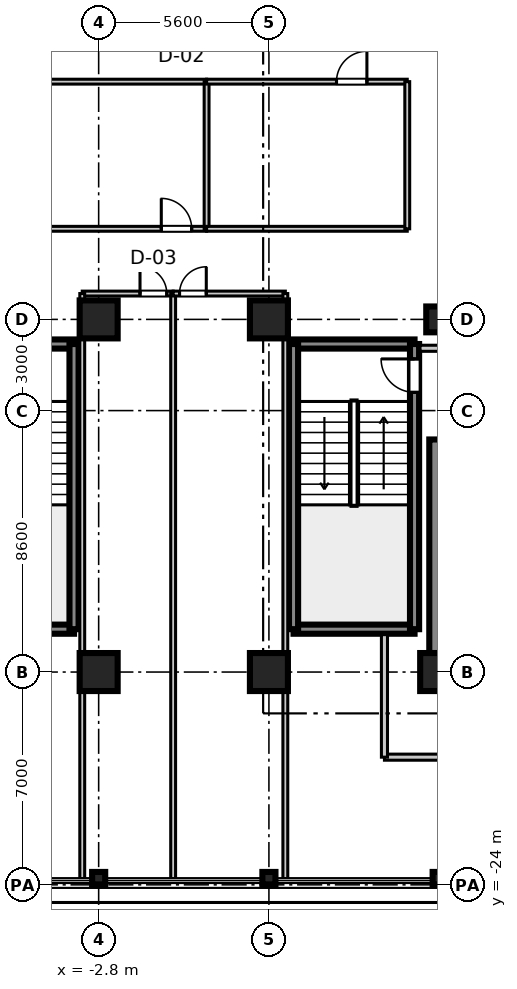
"""IFC4 building model, lengths in metres.
Left out: names, types, materials, properties, quantities, classifications, styles, units other than length and angle.
Written with IfcOpenShell. Run it as: python <this file> out.ifc"""

import sys

from ifc_helpers import new_model, si_unit, direction, frame, frame_2d, origin, origin_2d, place, context, subcontext, project, spatial, rectangle, i_section, extrude, source, transform, mapped, element, fill, save


model = new_model("IFC4")
c1 = context("Model", 3, precision=1e-05, world=origin(), true_north=direction((0.0, 1.0)))
c2 = subcontext(c1, "Body", "Model", "MODEL_VIEW")
j1 = project(units=[si_unit("LENGTHUNIT", "METRE"), si_unit("PLANEANGLEUNIT", "RADIAN")], contexts=[c1])
p1 = place(None, origin())
s1 = spatial("IfcSite", under=j1, at=p1, CompositionType="ELEMENT")
p2 = place(p1, origin())
s2 = spatial("IfcBuilding", under=s1, at=p2, CompositionType="ELEMENT")
p3 = place(p2, frame((0.0, 0.0, 88.3)))
s3 = spatial("IfcBuildingStorey", under=s2, at=p3, CompositionType="ELEMENT", Elevation=88.3)
m1 = source(origin(), c2, "Body", "SweptSolid", [
    extrude(rectangle(XDim=1.25, YDim=1.25, at=origin_2d()), origin(), (0.0, 0.0, 1.0), 3.605),
])
for number, where, z_axis, x_axis in (
    (1, (-2.8, -17.0, 0.0), (0.0, 0.0, 1.0), (1.0, 0.0, 0.0)),
    (2, (-2.8, -5.4, 0.0), (0.0, 0.0, 1.0), (1.0, 0.0, 0.0)),
    (3, (2.8, -17.0, 0.0), (0.0, 0.0, 1.0), (1.0, 0.0, 0.0)),
    (4, (2.8, -5.4, 0.0), (0.0, 0.0, 1.0), (1.0, 0.0, 0.0)),
    (5, (8.4, -17.0, 0.0), (0.0, 0.0, 1.0), (1.0, 0.0, 0.0)),
):
    element("IfcColumn", number, at=place(p3, frame(where, z_axis=z_axis, x_axis=x_axis)), inside=s3, PredefinedType="COLUMN", context=c2, shape_type="MappedRepresentation", body=[
        mapped(m1, transform((0.0, 0.0, 0.0), scale=1.0)),
    ])
m2 = source(origin(), c2, "Body", "SweptSolid", [
    extrude(rectangle(XDim=0.85, YDim=0.85, at=origin_2d()), origin(), (0.0, 0.0, 1.0), 3.605),
])
p4 = place(p3, frame((8.4, -5.4, 0.0), z_axis=(0.0, 0.0, 1.0), x_axis=(1.0, 0.0, 0.0)))
e6 = element("IfcColumn", 6, at=p4, inside=s3, PredefinedType="PILASTER", context=c2, shape_type="MappedRepresentation", body=[
    mapped(m2, transform((0.0, 0.0, 0.0), scale=1.0)),
])
m3 = source(origin(), c2, "Body", "SweptSolid", [
    extrude(i_section(OverallWidth=0.409, OverallDepth=0.43, WebThickness=0.021, FlangeThickness=0.034, at=origin_2d()), origin(), (0.0, 0.0, 1.0), 3.605),
])
for number, where, z_axis, x_axis in (
    (7, (-2.8, -23.78, 0.0), (0.0, 0.0, 1.0), (0.0, 1.0, 0.0)),
    (8, (2.8, -23.78, 0.0), (0.0, 0.0, 1.0), (0.0, 1.0, 0.0)),
    (9, (8.4, -23.78, 0.0), (0.0, 0.0, 1.0), (0.0, 1.0, 0.0)),
):
    element("IfcColumn", number, at=place(p3, frame(where, z_axis=z_axis, x_axis=x_axis)), inside=s3, PredefinedType="COLUMN", context=c2, shape_type="MappedRepresentation", body=[
        mapped(m3, transform((0.0, 0.0, 0.0), scale=1.0)),
    ])
m4 = source(origin(), c2, "Body", "SweptSolid", [
    extrude(rectangle(XDim=7.65, YDim=0.65, at=frame_2d((3.825, 0.0))), origin(), (0.0, 0.0, 1.0), 3.38),
])
p5 = place(p3, frame((8.4, -17.0, 0.0), z_axis=(0.0, 0.0, 1.0), x_axis=(0.0, 1.0, 0.0)))
e10 = element("IfcWall", 10, at=p5, inside=s3, PredefinedType="SHEAR", context=c2, shape_type="MappedRepresentation", body=[
    mapped(m4, transform((0.0, 0.0, 0.0), scale=1.0)),
])
m5 = source(origin(), c2, "Body", "SweptSolid", [
    extrude(rectangle(XDim=3.98, YDim=0.3, at=frame_2d((1.99, 0.0))), origin(), (0.0, 0.0, 1.0), 3.38),
])
for number, where, z_axis, x_axis in (
    (11, (3.61, -15.59, 0.0), (0.0, 0.0, 1.0), (1.0, 0.0, 0.0)),
    (12, (3.61, -6.21, 0.0), (0.0, 0.0, 1.0), (1.0, 0.0, 0.0)),
):
    element("IfcWall", number, at=place(p3, frame(where, z_axis=z_axis, x_axis=x_axis)), inside=s3, PredefinedType="SHEAR", context=c2, shape_type="MappedRepresentation", body=[
        mapped(m5, transform((0.0, 0.0, 0.0), scale=1.0)),
    ])
m6 = source(origin(), c2, "Body", "SweptSolid", [
    extrude(rectangle(XDim=9.38, YDim=0.3, at=frame_2d((4.69, 0.0))), origin(), (0.0, 0.0, 1.0), 3.38),
])
p6 = place(p3, frame((3.61, -15.59, 0.0), z_axis=(0.0, 0.0, 1.0), x_axis=(0.0, 1.0, 0.0)))
e13 = element("IfcWall", 13, at=p6, inside=s3, PredefinedType="SHEAR", context=c2, shape_type="MappedRepresentation", body=[
    mapped(m6, transform((0.0, 0.0, 0.0), scale=1.0)),
])
p7 = place(p3, frame((7.59, -15.59, 0.0), z_axis=(0.0, 0.0, 1.0), x_axis=(0.0, 1.0, 0.0)))
e14 = element("IfcWall", 14, at=p7, inside=s3, PredefinedType="SHEAR", context=c2, shape_type="MappedRepresentation", body=[
    mapped(m6, transform((0.0, 0.0, 0.0), scale=1.0)),
])
p8 = place(p7, frame((7.79, 0.0, 0.0)))
e15 = element("IfcOpeningElement", 15, at=p8, cuts=e14, PredefinedType="OPENING", context=c2, shape_type="SweptSolid", body=[
    extrude(rectangle(XDim=1.1, YDim=2.15, at=frame_2d((0.55, 1.075))), frame((0.0, 0.16, 0.0), z_axis=(0.0, -1.0, 0.0), x_axis=(1.0, 0.0, 0.0)), (0.0, 0.0, 1.0), 0.32),
])
p9 = place(p3, frame((-7.59, -15.59, 0.0), z_axis=(0.0, 0.0, 1.0), x_axis=(1.0, 0.0, 0.0)))
e16 = element("IfcWall", 16, at=p9, inside=s3, PredefinedType="SHEAR", context=c2, shape_type="MappedRepresentation", body=[
    mapped(m5, transform((0.0, 0.0, 0.0), scale=1.0)),
])
p10 = place(p3, frame((-7.59, -6.21, 0.0), z_axis=(0.0, 0.0, 1.0), x_axis=(1.0, 0.0, 0.0)))
e17 = element("IfcWall", 17, at=p10, inside=s3, PredefinedType="SHEAR", context=c2, shape_type="MappedRepresentation", body=[
    mapped(m5, transform((0.0, 0.0, 0.0), scale=1.0)),
])
p11 = place(p10, frame((1.44, 0.0, 0.0)))
e18 = element("IfcOpeningElement", 18, at=p11, cuts=e17, PredefinedType="OPENING", context=c2, shape_type="SweptSolid", body=[
    extrude(rectangle(XDim=1.1, YDim=2.15, at=frame_2d((0.55, 1.075))), frame((0.0, 0.16, 0.0), z_axis=(0.0, -1.0, 0.0), x_axis=(1.0, 0.0, 0.0)), (0.0, 0.0, 1.0), 0.32),
])
p12 = place(p3, frame((-3.61, -15.59, 0.0), z_axis=(0.0, 0.0, 1.0), x_axis=(0.0, 1.0, 0.0)))
e19 = element("IfcWall", 19, at=p12, inside=s3, PredefinedType="SHEAR", context=c2, shape_type="MappedRepresentation", body=[
    mapped(m6, transform((0.0, 0.0, 0.0), scale=1.0)),
])
m7 = source(origin(), c2, "Body", "SweptSolid", [
    extrude(rectangle(XDim=5.82, YDim=0.2, at=frame_2d((2.91, 0.0))), origin(), (0.0, 0.0, 1.0), 2.72),
])
p13 = place(p3, frame((6.6, -19.8, 0.0), z_axis=(0.0, 0.0, 1.0), x_axis=(1.0, 0.0, 0.0)))
e20 = element("IfcWall", 20, at=p13, inside=s3, PredefinedType="PARTITIONING", context=c2, shape_type="MappedRepresentation", body=[
    mapped(m7, transform((0.0, 0.0, 0.0), scale=1.0)),
])
m8 = source(origin(), c2, "Body", "SweptSolid", [
    extrude(rectangle(XDim=4.03, YDim=0.2, at=frame_2d((2.015, 0.0))), origin(), (0.0, 0.0, 1.0), 2.72),
])
p14 = place(p3, frame((6.6, -19.8, 0.0), z_axis=(0.0, 0.0, 1.0), x_axis=(0.0, 1.0, 0.0)))
e21 = element("IfcWall", 21, at=p14, inside=s3, PredefinedType="PARTITIONING", context=c2, shape_type="MappedRepresentation", body=[
    mapped(m8, transform((0.0, 0.0, 0.0), scale=1.0)),
])
m9 = source(origin(), c2, "Body", "SweptSolid", [
    extrude(rectangle(XDim=0.97, YDim=0.2, at=frame_2d((0.485, 0.0))), origin(), (0.0, 0.0, 1.0), 2.72),
])
p15 = place(p3, frame((7.77, -6.35, 0.0), z_axis=(0.0, 0.0, 1.0), x_axis=(1.0, 0.0, 0.0)))
e22 = element("IfcWall", 22, at=p15, inside=s3, PredefinedType="PARTITIONING", context=c2, shape_type="MappedRepresentation", body=[
    mapped(m9, transform((0.0, 0.0, 0.0), scale=1.0)),
])
m10 = source(origin(), c2, "Body", "SweptSolid", [
    extrude(rectangle(XDim=2.99, YDim=0.16, at=frame_2d((1.495, 0.0))), origin(), (0.0, 0.0, 1.0), 2.72),
])
p16 = place(p3, frame((-3.34, -4.55, 0.0), z_axis=(0.0, 0.0, 1.0), x_axis=(1.0, 0.0, 0.0)))
e23 = element("IfcWall", 23, at=p16, inside=s3, PredefinedType="PARTITIONING", context=c2, shape_type="MappedRepresentation", body=[
    mapped(m10, transform((0.0, 0.0, 0.0), scale=1.0)),
])
p17 = place(p16, frame((1.9, 0.0, 0.0)))
e24 = element("IfcOpeningElement", 24, at=p17, cuts=e23, PredefinedType="OPENING", context=c2, shape_type="SweptSolid", body=[
    extrude(rectangle(XDim=0.88, YDim=2.1, at=frame_2d((0.44, 1.05))), frame((0.0, 0.09, 0.0), z_axis=(0.0, -1.0, 0.0), x_axis=(1.0, 0.0, 0.0)), (0.0, 0.0, 1.0), 0.18),
])
m11 = source(origin(), c2, "Body", "SweptSolid", [
    extrude(rectangle(XDim=19.25, YDim=0.16, at=frame_2d((9.625, 0.0))), origin(), (0.0, 0.0, 1.0), 2.72),
])
for number, where, z_axis, x_axis in (
    (25, (-3.34, -23.8, 0.0), (0.0, 0.0, 1.0), (0.0, 1.0, 0.0)),
    (26, (-0.35, -23.8, 0.0), (0.0, 0.0, 1.0), (0.0, 1.0, 0.0)),
):
    element("IfcWall", number, at=place(p3, frame(where, z_axis=z_axis, x_axis=x_axis)), inside=s3, PredefinedType="PARTITIONING", context=c2, shape_type="MappedRepresentation", body=[
        mapped(m11, transform((0.0, 0.0, 0.0), scale=1.0)),
    ])
m12 = source(origin(), c2, "Body", "SweptSolid", [
    extrude(rectangle(XDim=3.69, YDim=0.16, at=frame_2d((1.845, 0.0))), origin(), (0.0, 0.0, 1.0), 2.72),
])
p18 = place(p3, frame((-0.35, -4.55, 0.0), z_axis=(0.0, 0.0, 1.0), x_axis=(1.0, 0.0, 0.0)))
e27 = element("IfcWall", 27, at=p18, inside=s3, PredefinedType="PARTITIONING", context=c2, shape_type="MappedRepresentation", body=[
    mapped(m12, transform((0.0, 0.0, 0.0), scale=1.0)),
])
p19 = place(p18, frame((0.21, 0.0, 0.0)))
e28 = element("IfcOpeningElement", 28, at=p19, cuts=e27, PredefinedType="OPENING", context=c2, shape_type="SweptSolid", body=[
    extrude(rectangle(XDim=0.88, YDim=2.1, at=frame_2d((0.44, 1.05))), frame((0.0, 0.09, 0.0), z_axis=(0.0, -1.0, 0.0), x_axis=(1.0, 0.0, 0.0)), (0.0, 0.0, 1.0), 0.18),
])
p20 = place(p3, frame((3.34, -23.8, 0.0), z_axis=(0.0, 0.0, 1.0), x_axis=(0.0, 1.0, 0.0)))
e29 = element("IfcWall", 29, at=p20, inside=s3, PredefinedType="PARTITIONING", context=c2, shape_type="MappedRepresentation", body=[
    mapped(m11, transform((0.0, 0.0, 0.0), scale=1.0)),
])
m13 = source(origin(), c2, "Body", "SweptSolid", [
    extrude(rectangle(XDim=6.8, YDim=0.16, at=frame_2d((3.4, 0.0))), origin(), (0.0, 0.0, 1.0), 2.72),
])
p21 = place(p3, frame((-6.05, -2.42, 0.0), z_axis=(0.0, 0.0, 1.0), x_axis=(1.0, 0.0, 0.0)))
e30 = element("IfcWall", 30, at=p21, inside=s3, PredefinedType="PARTITIONING", context=c2, shape_type="MappedRepresentation", body=[
    mapped(m13, transform((0.0, 0.0, 0.0), scale=1.0)),
])
p22 = place(p21, frame((5.31, 0.0, 0.0)))
e31 = element("IfcOpeningElement", 31, at=p22, cuts=e30, PredefinedType="OPENING", context=c2, shape_type="SweptSolid", body=[
    extrude(rectangle(XDim=1.0, YDim=2.1, at=frame_2d((0.5, 1.05))), frame((0.0, 0.09, 0.0), z_axis=(0.0, -1.0, 0.0), x_axis=(1.0, 0.0, 0.0)), (0.0, 0.0, 1.0), 0.18),
])
p23 = place(p3, frame((-6.05, 2.42, 0.0), z_axis=(0.0, 0.0, 1.0), x_axis=(1.0, 0.0, 0.0)))
e32 = element("IfcWall", 32, at=p23, inside=s3, PredefinedType="PARTITIONING", context=c2, shape_type="MappedRepresentation", body=[
    mapped(m13, transform((0.0, 0.0, 0.0), scale=1.0)),
])
m14 = source(origin(), c2, "Body", "SweptSolid", [
    extrude(rectangle(XDim=4.84, YDim=0.16, at=frame_2d((2.42, 0.0))), origin(), (0.0, 0.0, 1.0), 2.72),
])
p24 = place(p3, frame((0.75, -2.42, 0.0), z_axis=(0.0, 0.0, 1.0), x_axis=(0.0, 1.0, 0.0)))
e33 = element("IfcWall", 33, at=p24, inside=s3, PredefinedType="PARTITIONING", context=c2, shape_type="MappedRepresentation", body=[
    mapped(m14, transform((0.0, 0.0, 0.0), scale=1.0)),
])
m15 = source(origin(), c2, "Body", "SweptSolid", [
    extrude(rectangle(XDim=6.6, YDim=0.16, at=frame_2d((3.3, 0.0))), origin(), (0.0, 0.0, 1.0), 2.72),
])
p25 = place(p3, frame((0.75, -2.42, 0.0), z_axis=(0.0, 0.0, 1.0), x_axis=(1.0, 0.0, 0.0)))
e34 = element("IfcWall", 34, at=p25, inside=s3, PredefinedType="PARTITIONING", context=c2, shape_type="MappedRepresentation", body=[
    mapped(m15, transform((0.0, 0.0, 0.0), scale=1.0)),
])
p26 = place(p3, frame((0.75, 2.42, 0.0), z_axis=(0.0, 0.0, 1.0), x_axis=(1.0, 0.0, 0.0)))
e35 = element("IfcWall", 35, at=p26, inside=s3, PredefinedType="PARTITIONING", context=c2, shape_type="MappedRepresentation", body=[
    mapped(m15, transform((0.0, 0.0, 0.0), scale=1.0)),
])
p27 = place(p26, frame((4.273, 0.0, 0.0)))
e36 = element("IfcOpeningElement", 36, at=p27, cuts=e35, PredefinedType="OPENING", context=c2, shape_type="SweptSolid", body=[
    extrude(rectangle(XDim=1.0, YDim=2.1, at=frame_2d((0.5, 1.05))), frame((0.0, 0.09, 0.0), z_axis=(0.0, -1.0, 0.0), x_axis=(1.0, 0.0, 0.0)), (0.0, 0.0, 1.0), 0.18),
])
p28 = place(p3, frame((7.35, -2.42, 0.0), z_axis=(0.0, 0.0, 1.0), x_axis=(0.0, 1.0, 0.0)))
e37 = element("IfcWall", 37, at=p28, inside=s3, PredefinedType="PARTITIONING", context=c2, shape_type="MappedRepresentation", body=[
    mapped(m14, transform((0.0, 0.0, 0.0), scale=1.0)),
])
m16 = source(origin(), c2, "Body", "SweptSolid", [
    extrude(rectangle(XDim=1.1, YDim=2.15, at=frame_2d((0.55, 1.075))), frame((0.0, 0.025, 0.0), z_axis=(0.0, -1.0, 0.0), x_axis=(1.0, 0.0, 0.0)), (0.0, 0.0, 1.0), 0.05),
])
p29 = place(p8, origin())
e38 = element("IfcDoor", 38, at=p29, inside=s3, OperationType="SINGLE_SWING_RIGHT", PredefinedType="DOOR", context=c2, shape_type="MappedRepresentation", body=[
    mapped(m16, transform((0.0, 0.0, 0.0), scale=1.0)),
])
fill(e15, e38)
m17 = source(origin(), c2, "Body", "SweptSolid", [
    extrude(rectangle(XDim=0.88, YDim=2.1, at=frame_2d((0.44, 1.05))), frame((0.0, 0.025, 0.0), z_axis=(0.0, -1.0, 0.0), x_axis=(1.0, 0.0, 0.0)), (0.0, 0.0, 1.0), 0.05),
])
p30 = place(p17, frame((0.88, 0.0, 0.0), z_axis=(0.0, 0.0, 1.0), x_axis=(-1.0, 0.0, 0.0)))
e39 = element("IfcDoor", 39, at=p30, inside=s3, OperationType="SINGLE_SWING_LEFT", PredefinedType="DOOR", context=c2, shape_type="MappedRepresentation", body=[
    mapped(m17, transform((0.0, 0.0, 0.0), scale=1.0)),
])
fill(e24, e39)
p31 = place(p19, frame((0.88, 0.0, 0.0), z_axis=(0.0, 0.0, 1.0), x_axis=(-1.0, 0.0, 0.0)))
e40 = element("IfcDoor", 40, at=p31, inside=s3, OperationType="SINGLE_SWING_RIGHT", PredefinedType="DOOR", context=c2, shape_type="MappedRepresentation", body=[
    mapped(m17, transform((0.0, 0.0, 0.0), scale=1.0)),
])
fill(e28, e40)
m18 = source(origin(), c2, "Body", "SweptSolid", [
    extrude(rectangle(XDim=1.0, YDim=2.1, at=frame_2d((0.5, 1.05))), frame((0.0, 0.025, 0.0), z_axis=(0.0, -1.0, 0.0), x_axis=(1.0, 0.0, 0.0)), (0.0, 0.0, 1.0), 0.05),
])
p32 = place(p22, origin())
e41 = element("IfcDoor", 41, at=p32, inside=s3, OperationType="SINGLE_SWING_LEFT", PredefinedType="DOOR", context=c2, shape_type="MappedRepresentation", body=[
    mapped(m18, transform((0.0, 0.0, 0.0), scale=1.0)),
])
fill(e31, e41)
p33 = place(p27, frame((1.0, 0.0, 0.0), z_axis=(0.0, 0.0, 1.0), x_axis=(-1.0, 0.0, 0.0)))
e42 = element("IfcDoor", 42, at=p33, inside=s3, OperationType="SINGLE_SWING_RIGHT", PredefinedType="DOOR", context=c2, shape_type="MappedRepresentation", body=[
    mapped(m18, transform((0.0, 0.0, 0.0), scale=1.0)),
])
fill(e36, e42)
save(model, sys.argv[1])
